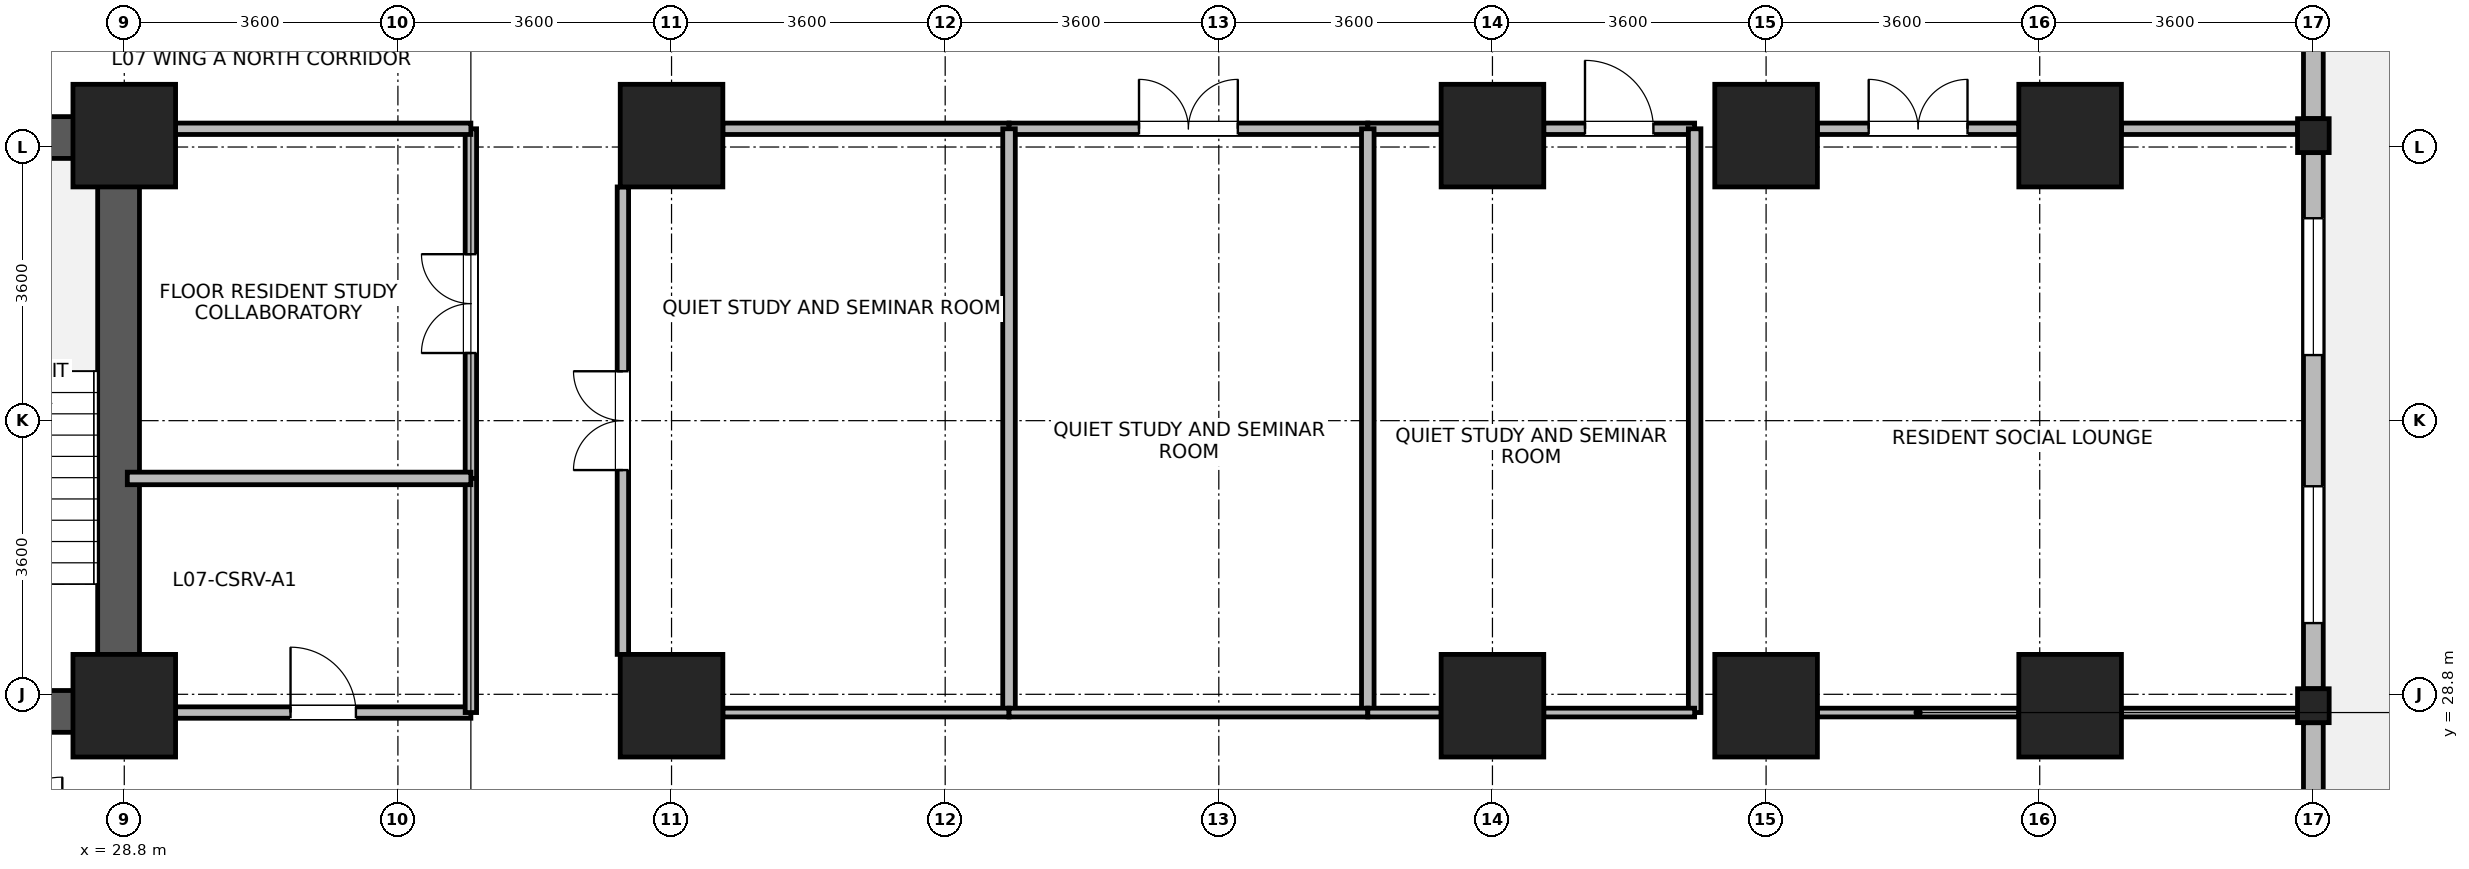
"""IFC4 building model, lengths in metres.
Left out: names, types, materials, properties, quantities, classifications, styles, units other than length and angle.
Written with IfcOpenShell. Run it as: python <this file> out.ifc"""

import sys

from ifc_helpers import new_model, si_unit, direction, frame, frame_2d, origin, origin_2d, place, context, subcontext, project, spatial, rectangle, i_section, extrude, source, transform, mapped, element, fill, save


model = new_model("IFC4")
c1 = context("Model", 3, precision=1e-05, world=origin(), true_north=direction((0.0, 1.0)))
c2 = subcontext(c1, "Body", "Model", "MODEL_VIEW")
j1 = project(units=[si_unit("LENGTHUNIT", "METRE"), si_unit("PLANEANGLEUNIT", "RADIAN")], contexts=[c1])
p1 = place(None, origin())
s1 = spatial("IfcSite", under=j1, at=p1, CompositionType="ELEMENT")
p2 = place(p1, origin())
s2 = spatial("IfcBuilding", under=s1, at=p2, CompositionType="ELEMENT")
p3 = place(p2, frame((0.0, 0.0, 32.7)))
s3 = spatial("IfcBuildingStorey", under=s2, at=p3, CompositionType="ELEMENT", Elevation=32.7)
p4 = place(p3, frame((28.725, 28.3, 0.0), z_axis=(0.0, 0.0, 1.0), x_axis=(0.0, 1.0, 0.0)))
e1 = element("IfcWall", 1, at=p4, inside=s3, PredefinedType="SHEAR", context=c2, shape_type="SweptSolid", body=[
    extrude(rectangle(XDim=8.1, YDim=0.55, at=frame_2d((4.05, 0.0))), origin(), (0.0, 0.0, 1.0), 3.45),
])
for number, where, z_axis, x_axis in (
    (2, (25.25, 28.575, 0.0), (0.0, 0.0, 1.0), (1.0, 0.0, 0.0)),
    (3, (25.25, 36.125, 0.0), (0.0, 0.0, 1.0), (1.0, 0.0, 0.0)),
):
    element("IfcWall", number, at=place(p3, frame(where, z_axis=z_axis, x_axis=x_axis)), inside=s3, PredefinedType="SHEAR", context=c2, shape_type="SweptSolid", body=[
        extrude(rectangle(XDim=3.2, YDim=0.55, at=frame_2d((1.6, 0.0))), origin(), (0.0, 0.0, 1.0), 3.45),
    ])
m1 = source(origin(), c2, "Body", "SweptSolid", [
    extrude(rectangle(XDim=1.35, YDim=1.35, at=origin_2d()), origin(), (0.0, 0.0, 1.0), 3.7),
])
for number, where, z_axis, x_axis in (
    (4, (28.8, 28.65, 0.0), (0.0, 0.0, 1.0), (1.0, 0.0, 0.0)),
    (5, (28.8, 36.15, 0.0), (0.0, 0.0, 1.0), (1.0, 0.0, 0.0)),
    (6, (36.0, 28.65, 0.0), (0.0, 0.0, 1.0), (1.0, 0.0, 0.0)),
    (7, (36.0, 36.15, 0.0), (0.0, 0.0, 1.0), (1.0, 0.0, 0.0)),
    (8, (46.8, 28.65, 0.0), (0.0, 0.0, 1.0), (1.0, 0.0, 0.0)),
    (9, (46.8, 36.15, 0.0), (0.0, 0.0, 1.0), (1.0, 0.0, 0.0)),
    (10, (50.4, 28.65, 0.0), (0.0, 0.0, 1.0), (1.0, 0.0, 0.0)),
    (11, (50.4, 36.15, 0.0), (0.0, 0.0, 1.0), (1.0, 0.0, 0.0)),
    (12, (54.4, 28.65, 0.0), (0.0, 0.0, 1.0), (1.0, 0.0, 0.0)),
    (13, (54.4, 36.15, 0.0), (0.0, 0.0, 1.0), (1.0, 0.0, 0.0)),
):
    element("IfcColumn", number, at=place(p3, frame(where, z_axis=z_axis, x_axis=x_axis)), inside=s3, PredefinedType="COLUMN", context=c2, shape_type="MappedRepresentation", body=[
        mapped(m1, transform((0.0, 0.0, 0.0), x_axis=(1.0, 0.0, 0.0), y_axis=(0.0, 1.0, 0.0), z_axis=(0.0, 0.0, 1.0), scale=1.0)),
    ])
m2 = source(origin(), c2, "Body", "SweptSolid", [
    extrude(i_section(OverallWidth=0.416, OverallDepth=0.446, WebThickness=0.029, FlangeThickness=0.04, FilletRadius=0.015, at=origin_2d()), origin(), (0.0, 0.0, 1.0), 3.7),
])
for number, where, z_axis, x_axis in (
    (14, (57.6, 28.65, 0.0), (0.0, 0.0, 1.0), (1.0, 0.0, 0.0)),
    (15, (57.6, 36.15, 0.0), (0.0, 0.0, 1.0), (1.0, 0.0, 0.0)),
):
    element("IfcColumn", number, at=place(p3, frame(where, z_axis=z_axis, x_axis=x_axis)), inside=s3, PredefinedType="COLUMN", context=c2, shape_type="MappedRepresentation", body=[
        mapped(m2, transform((0.0, 0.0, 0.0), x_axis=(1.0, 0.0, 0.0), y_axis=(0.0, 1.0, 0.0), z_axis=(0.0, 0.0, 1.0), scale=1.0)),
    ])
p5 = place(p3, frame((57.6, 28.426, 0.0), z_axis=(0.0, 0.0, 1.0), x_axis=(0.0, -1.0, 0.0)))
e16 = element("IfcWall", 16, at=p5, inside=s3, PredefinedType="STANDARD", context=c2, shape_type="SweptSolid", body=[
    extrude(rectangle(XDim=6.602, YDim=0.26, at=frame_2d((3.301, 0.0))), origin(), (0.0, 0.0, 1.0), 2.93),
])
p6 = place(p5, frame((4.052, 0.0, 0.85)))
e17 = element("IfcOpeningElement", 17, at=p6, cuts=e16, PredefinedType="OPENING", context=c2, shape_type="SweptSolid", body=[
    extrude(rectangle(XDim=1.8, YDim=1.85, at=frame_2d((0.9, 0.925))), frame((0.0, 0.14, 0.0), z_axis=(0.0, -1.0, 0.0), x_axis=(1.0, 0.0, 0.0)), (0.0, 0.0, 1.0), 0.28),
])
p7 = place(p5, frame((2.298, 0.0, 0.85)))
e18 = element("IfcOpeningElement", 18, at=p7, cuts=e16, PredefinedType="OPENING", context=c2, shape_type="SweptSolid", body=[
    extrude(rectangle(XDim=0.95, YDim=1.75, at=frame_2d((0.475, 0.875))), frame((0.0, 0.14, 0.0), z_axis=(0.0, -1.0, 0.0), x_axis=(1.0, 0.0, 0.0)), (0.0, 0.0, 1.0), 0.28),
])
p8 = place(p3, frame((57.6, 35.926, 0.0), z_axis=(0.0, 0.0, 1.0), x_axis=(0.0, -1.0, 0.0)))
e19 = element("IfcWall", 19, at=p8, inside=s3, PredefinedType="STANDARD", context=c2, shape_type="SweptSolid", body=[
    extrude(rectangle(XDim=7.052, YDim=0.26, at=frame_2d((3.526, 0.0))), origin(), (0.0, 0.0, 1.0), 2.93),
])
p9 = place(p8, frame((0.863, 0.0, 0.85)))
e20 = element("IfcOpeningElement", 20, at=p9, cuts=e19, PredefinedType="OPENING", context=c2, shape_type="SweptSolid", body=[
    extrude(rectangle(XDim=1.8, YDim=1.85, at=frame_2d((0.9, 0.925))), frame((0.0, 0.14, 0.0), z_axis=(0.0, -1.0, 0.0), x_axis=(1.0, 0.0, 0.0)), (0.0, 0.0, 1.0), 0.28),
])
p10 = place(p8, frame((4.389, 0.0, 0.85)))
e21 = element("IfcOpeningElement", 21, at=p10, cuts=e19, PredefinedType="OPENING", context=c2, shape_type="SweptSolid", body=[
    extrude(rectangle(XDim=1.8, YDim=1.85, at=frame_2d((0.9, 0.925))), frame((0.0, 0.14, 0.0), z_axis=(0.0, -1.0, 0.0), x_axis=(1.0, 0.0, 0.0)), (0.0, 0.0, 1.0), 0.28),
])
p11 = place(p3, frame((57.6, 43.33, 0.0), z_axis=(0.0, 0.0, 1.0), x_axis=(0.0, -1.0, 0.0)))
e22 = element("IfcWall", 22, at=p11, inside=s3, PredefinedType="STANDARD", context=c2, shape_type="SweptSolid", body=[
    extrude(rectangle(XDim=6.956, YDim=0.26, at=frame_2d((3.478, 0.0))), origin(), (0.0, 0.0, 1.0), 3.43),
])
p12 = place(p11, frame((0.839, 0.0, 0.85)))
e23 = element("IfcOpeningElement", 23, at=p12, cuts=e22, PredefinedType="OPENING", context=c2, shape_type="SweptSolid", body=[
    extrude(rectangle(XDim=1.8, YDim=1.85, at=frame_2d((0.9, 0.925))), frame((0.0, 0.14, 0.0), z_axis=(0.0, -1.0, 0.0), x_axis=(1.0, 0.0, 0.0)), (0.0, 0.0, 1.0), 0.28),
])
p13 = place(p11, frame((3.003, 0.0, 0.85)))
e24 = element("IfcOpeningElement", 24, at=p13, cuts=e22, PredefinedType="OPENING", context=c2, shape_type="SweptSolid", body=[
    extrude(rectangle(XDim=0.95, YDim=1.75, at=frame_2d((0.475, 0.875))), frame((0.0, 0.14, 0.0), z_axis=(0.0, -1.0, 0.0), x_axis=(1.0, 0.0, 0.0)), (0.0, 0.0, 1.0), 0.28),
])
p14 = place(p3, frame((51.075, 36.24, 0.0), z_axis=(0.0, 0.0, 1.0), x_axis=(1.0, 0.0, 0.0)))
e25 = element("IfcWall", 25, at=p14, inside=s3, PredefinedType="PARTITIONING", context=c2, shape_type="SweptSolid", body=[
    extrude(rectangle(XDim=2.65, YDim=0.15, at=frame_2d((1.325, 0.0))), origin(), (0.0, 0.0, 1.0), 2.78),
])
p15 = place(p14, frame((0.675, 0.0, 0.0)))
e26 = element("IfcOpeningElement", 26, at=p15, cuts=e25, PredefinedType="OPENING", context=c2, shape_type="SweptSolid", body=[
    extrude(rectangle(XDim=1.3, YDim=2.12, at=frame_2d((0.65, 1.06))), frame((0.0, 0.085, 0.0), z_axis=(0.0, -1.0, 0.0), x_axis=(1.0, 0.0, 0.0)), (0.0, 0.0, 1.0), 0.17),
])
p16 = place(p3, frame((55.075, 36.24, 0.0), z_axis=(0.0, 0.0, 1.0), x_axis=(1.0, 0.0, 0.0)))
e27 = element("IfcWall", 27, at=p16, inside=s3, PredefinedType="PARTITIONING", context=c2, shape_type="SweptSolid", body=[
    extrude(rectangle(XDim=2.317, YDim=0.15, at=frame_2d((1.159, 0.0))), origin(), (0.0, 0.0, 1.0), 2.78),
])
p17 = place(p3, frame((35.36, 29.325, 0.0), z_axis=(0.0, 0.0, 1.0), x_axis=(0.0, 1.0, 0.0)))
e28 = element("IfcWall", 28, at=p17, inside=s3, PredefinedType="PARTITIONING", context=c2, shape_type="SweptSolid", body=[
    extrude(rectangle(XDim=6.15, YDim=0.15, at=frame_2d((3.075, 0.0))), origin(), (0.0, 0.0, 1.0), 3.43),
])
p18 = place(p17, frame((2.425, 0.0, 0.0)))
e29 = element("IfcOpeningElement", 29, at=p18, cuts=e28, PredefinedType="OPENING", context=c2, shape_type="SweptSolid", body=[
    extrude(rectangle(XDim=1.3, YDim=2.12, at=frame_2d((0.65, 1.06))), frame((0.0, 0.085, 0.0), z_axis=(0.0, -1.0, 0.0), x_axis=(1.0, 0.0, 0.0)), (0.0, 0.0, 1.0), 0.17),
])
p19 = place(p3, frame((36.675, 36.24, 0.0), z_axis=(0.0, 0.0, 1.0), x_axis=(1.0, 0.0, 0.0)))
e30 = element("IfcWall", 30, at=p19, inside=s3, PredefinedType="PARTITIONING", context=c2, shape_type="SweptSolid", body=[
    extrude(rectangle(XDim=3.765, YDim=0.15, at=frame_2d((1.882, 0.0))), origin(), (0.0, 0.0, 1.0), 2.78),
])
p20 = place(p3, frame((40.44, 36.24, 0.0), z_axis=(0.0, 0.0, 1.0), x_axis=(1.0, 0.0, 0.0)))
e31 = element("IfcWall", 31, at=p20, inside=s3, PredefinedType="PARTITIONING", context=c2, shape_type="SweptSolid", body=[
    extrude(rectangle(XDim=4.72, YDim=0.15, at=frame_2d((2.36, 0.0))), origin(), (0.0, 0.0, 1.0), 2.78),
])
p21 = place(p20, frame((1.71, 0.0, 0.0)))
e32 = element("IfcOpeningElement", 32, at=p21, cuts=e31, PredefinedType="OPENING", context=c2, shape_type="SweptSolid", body=[
    extrude(rectangle(XDim=1.3, YDim=2.12, at=frame_2d((0.65, 1.06))), frame((0.0, 0.085, 0.0), z_axis=(0.0, -1.0, 0.0), x_axis=(1.0, 0.0, 0.0)), (0.0, 0.0, 1.0), 0.17),
])
p22 = place(p3, frame((33.36, 31.64, 0.0), z_axis=(0.0, 0.0, 1.0), x_axis=(0.0, 1.0, 0.0)))
e33 = element("IfcWall", 33, at=p22, inside=s3, PredefinedType="PARTITIONING", context=c2, shape_type="SweptSolid", body=[
    extrude(rectangle(XDim=4.6, YDim=0.15, at=frame_2d((2.3, 0.0))), origin(), (0.0, 0.0, 1.0), 3.43),
])
p23 = place(p22, frame((1.65, 0.0, 0.0)))
e34 = element("IfcOpeningElement", 34, at=p23, cuts=e33, PredefinedType="OPENING", context=c2, shape_type="SweptSolid", body=[
    extrude(rectangle(XDim=1.3, YDim=2.12, at=frame_2d((0.65, 1.06))), frame((0.0, 0.085, 0.0), z_axis=(0.0, -1.0, 0.0), x_axis=(1.0, 0.0, 0.0)), (0.0, 0.0, 1.0), 0.17),
])
p24 = place(p3, frame((29.475, 28.56, 0.0), z_axis=(0.0, 0.0, 1.0), x_axis=(1.0, 0.0, 0.0)))
e35 = element("IfcWall", 35, at=p24, inside=s3, PredefinedType="PARTITIONING", context=c2, shape_type="SweptSolid", body=[
    extrude(rectangle(XDim=3.885, YDim=0.15, at=frame_2d((1.942, 0.0))), origin(), (0.0, 0.0, 1.0), 2.78),
])
p25 = place(p24, frame((1.512, 0.0, 0.0)))
e36 = element("IfcOpeningElement", 36, at=p25, cuts=e35, PredefinedType="OPENING", context=c2, shape_type="SweptSolid", body=[
    extrude(rectangle(XDim=0.86, YDim=2.02, at=frame_2d((0.43, 1.01))), frame((0.0, 0.085, 0.0), z_axis=(0.0, -1.0, 0.0), x_axis=(1.0, 0.0, 0.0)), (0.0, 0.0, 1.0), 0.17),
])
p26 = place(p3, frame((29.475, 36.24, 0.0), z_axis=(0.0, 0.0, 1.0), x_axis=(1.0, 0.0, 0.0)))
e37 = element("IfcWall", 37, at=p26, inside=s3, PredefinedType="PARTITIONING", context=c2, shape_type="SweptSolid", body=[
    extrude(rectangle(XDim=3.885, YDim=0.15, at=frame_2d((1.942, 0.0))), origin(), (0.0, 0.0, 1.0), 2.78),
])
p27 = place(p3, frame((45.16, 36.24, 0.0), z_axis=(0.0, 0.0, 1.0), x_axis=(1.0, 0.0, 0.0)))
e38 = element("IfcWall", 38, at=p27, inside=s3, PredefinedType="PARTITIONING", context=c2, shape_type="SweptSolid", body=[
    extrude(rectangle(XDim=0.965, YDim=0.15, at=frame_2d((0.482, 0.0))), origin(), (0.0, 0.0, 1.0), 2.78),
])
p28 = place(p3, frame((47.475, 36.24, 0.0), z_axis=(0.0, 0.0, 1.0), x_axis=(1.0, 0.0, 0.0)))
e39 = element("IfcWall", 39, at=p28, inside=s3, PredefinedType="PARTITIONING", context=c2, shape_type="SweptSolid", body=[
    extrude(rectangle(XDim=1.985, YDim=0.15, at=frame_2d((0.992, 0.0))), origin(), (0.0, 0.0, 1.0), 2.78),
])
p29 = place(p28, frame((0.542, 0.0, 0.0)))
e40 = element("IfcOpeningElement", 40, at=p29, cuts=e39, PredefinedType="OPENING", context=c2, shape_type="SweptSolid", body=[
    extrude(rectangle(XDim=0.9, YDim=2.08, at=frame_2d((0.45, 1.04))), frame((0.0, 0.085, 0.0), z_axis=(0.0, -1.0, 0.0), x_axis=(1.0, 0.0, 0.0)), (0.0, 0.0, 1.0), 0.17),
])
p30 = place(p3, frame((33.36, 28.56, 0.0), z_axis=(0.0, 0.0, 1.0), x_axis=(0.0, 1.0, 0.0)))
e41 = element("IfcWall", 41, at=p30, inside=s3, PredefinedType="PARTITIONING", context=c2, shape_type="SweptSolid", body=[
    extrude(rectangle(XDim=3.08, YDim=0.15, at=frame_2d((1.54, 0.0))), origin(), (0.0, 0.0, 1.0), 3.43),
])
p31 = place(p3, frame((51.075, 28.56, 0.0), z_axis=(0.0, 0.0, 1.0), x_axis=(1.0, 0.0, 0.0)))
e42 = element("IfcWall", 42, at=p31, inside=s3, PredefinedType="PARTITIONING", context=c2, shape_type="SweptSolid", body=[
    extrude(rectangle(XDim=2.65, YDim=0.115, at=frame_2d((1.325, 0.0))), origin(), (0.0, 0.0, 1.0), 2.78),
])
p32 = place(p3, frame((55.075, 28.56, 0.0), z_axis=(0.0, 0.0, 1.0), x_axis=(1.0, 0.0, 0.0)))
e43 = element("IfcWall", 43, at=p32, inside=s3, PredefinedType="PARTITIONING", context=c2, shape_type="SweptSolid", body=[
    extrude(rectangle(XDim=2.317, YDim=0.115, at=frame_2d((1.159, 0.0))), origin(), (0.0, 0.0, 1.0), 2.78),
])
for number, where, z_axis, x_axis in (
    (44, (40.44, 28.56, 0.0), (0.0, 0.0, 1.0), (0.0, 1.0, 0.0)),
    (45, (45.16, 28.56, 0.0), (0.0, 0.0, 1.0), (0.0, 1.0, 0.0)),
    (46, (49.46, 28.56, 0.0), (0.0, 0.0, 1.0), (0.0, 1.0, 0.0)),
):
    element("IfcWall", number, at=place(p3, frame(where, z_axis=z_axis, x_axis=x_axis)), inside=s3, PredefinedType="PARTITIONING", context=c2, shape_type="SweptSolid", body=[
        extrude(rectangle(XDim=7.68, YDim=0.165, at=frame_2d((3.84, 0.0))), origin(), (0.0, 0.0, 1.0), 3.43),
    ])
p33 = place(p3, frame((36.675, 28.56, 0.0), z_axis=(0.0, 0.0, 1.0), x_axis=(1.0, 0.0, 0.0)))
e47 = element("IfcWall", 47, at=p33, inside=s3, PredefinedType="PARTITIONING", context=c2, shape_type="SweptSolid", body=[
    extrude(rectangle(XDim=3.765, YDim=0.115, at=frame_2d((1.882, 0.0))), origin(), (0.0, 0.0, 1.0), 2.78),
])
p34 = place(p3, frame((40.44, 28.56, 0.0), z_axis=(0.0, 0.0, 1.0), x_axis=(1.0, 0.0, 0.0)))
e48 = element("IfcWall", 48, at=p34, inside=s3, PredefinedType="PARTITIONING", context=c2, shape_type="SweptSolid", body=[
    extrude(rectangle(XDim=4.72, YDim=0.115, at=frame_2d((2.36, 0.0))), origin(), (0.0, 0.0, 1.0), 2.78),
])
p35 = place(p3, frame((28.84, 31.64, 0.0), z_axis=(0.0, 0.0, 1.0), x_axis=(1.0, 0.0, 0.0)))
e49 = element("IfcWall", 49, at=p35, inside=s3, PredefinedType="PARTITIONING", context=c2, shape_type="SweptSolid", body=[
    extrude(rectangle(XDim=4.52, YDim=0.165, at=frame_2d((2.26, 0.0))), origin(), (0.0, 0.0, 1.0), 3.43),
])
p36 = place(p3, frame((45.16, 28.56, 0.0), z_axis=(0.0, 0.0, 1.0), x_axis=(1.0, 0.0, 0.0)))
e50 = element("IfcWall", 50, at=p36, inside=s3, PredefinedType="PARTITIONING", context=c2, shape_type="SweptSolid", body=[
    extrude(rectangle(XDim=0.965, YDim=0.115, at=frame_2d((0.482, 0.0))), origin(), (0.0, 0.0, 1.0), 2.78),
])
p37 = place(p3, frame((47.475, 28.56, 0.0), z_axis=(0.0, 0.0, 1.0), x_axis=(1.0, 0.0, 0.0)))
e51 = element("IfcWall", 51, at=p37, inside=s3, PredefinedType="PARTITIONING", context=c2, shape_type="SweptSolid", body=[
    extrude(rectangle(XDim=1.985, YDim=0.115, at=frame_2d((0.992, 0.0))), origin(), (0.0, 0.0, 1.0), 2.78),
])
p38 = place(p9, origin())
e52 = element("IfcWindow", 52, at=p38, inside=s3, PartitioningType="SINGLE_PANEL", PredefinedType="WINDOW", context=c2, shape_type="SweptSolid", body=[
    extrude(rectangle(XDim=1.8, YDim=1.85, at=frame_2d((0.9, 0.925))), frame((0.0, 0.03, 0.0), z_axis=(0.0, -1.0, 0.0), x_axis=(1.0, 0.0, 0.0)), (0.0, 0.0, 1.0), 0.06),
])
fill(e20, e52)
p39 = place(p10, origin())
e53 = element("IfcWindow", 53, at=p39, inside=s3, PartitioningType="SINGLE_PANEL", PredefinedType="WINDOW", context=c2, shape_type="SweptSolid", body=[
    extrude(rectangle(XDim=1.8, YDim=1.85, at=frame_2d((0.9, 0.925))), frame((0.0, 0.03, 0.0), z_axis=(0.0, -1.0, 0.0), x_axis=(1.0, 0.0, 0.0)), (0.0, 0.0, 1.0), 0.06),
])
fill(e21, e53)
p40 = place(p15, origin())
e54 = element("IfcDoor", 54, at=p40, inside=s3, OperationType="DOUBLE_DOOR_SINGLE_SWING", PredefinedType="DOOR", context=c2, shape_type="SweptSolid", body=[
    extrude(rectangle(XDim=1.3, YDim=2.12, at=frame_2d((0.65, 1.06))), frame((0.0, 0.025, 0.0), z_axis=(0.0, -1.0, 0.0), x_axis=(1.0, 0.0, 0.0)), (0.0, 0.0, 1.0), 0.05),
])
fill(e26, e54)
p41 = place(p18, origin())
e55 = element("IfcDoor", 55, at=p41, inside=s3, OperationType="DOUBLE_DOOR_SINGLE_SWING", PredefinedType="DOOR", context=c2, shape_type="SweptSolid", body=[
    extrude(rectangle(XDim=1.3, YDim=2.12, at=frame_2d((0.65, 1.06))), frame((0.0, 0.025, 0.0), z_axis=(0.0, -1.0, 0.0), x_axis=(1.0, 0.0, 0.0)), (0.0, 0.0, 1.0), 0.05),
])
fill(e29, e55)
p42 = place(p21, origin())
e56 = element("IfcDoor", 56, at=p42, inside=s3, OperationType="DOUBLE_DOOR_SINGLE_SWING", PredefinedType="DOOR", context=c2, shape_type="SweptSolid", body=[
    extrude(rectangle(XDim=1.3, YDim=2.12, at=frame_2d((0.65, 1.06))), frame((0.0, 0.025, 0.0), z_axis=(0.0, -1.0, 0.0), x_axis=(1.0, 0.0, 0.0)), (0.0, 0.0, 1.0), 0.05),
])
fill(e32, e56)
p43 = place(p23, origin())
e57 = element("IfcDoor", 57, at=p43, inside=s3, OperationType="DOUBLE_DOOR_SINGLE_SWING", PredefinedType="DOOR", context=c2, shape_type="SweptSolid", body=[
    extrude(rectangle(XDim=1.3, YDim=2.12, at=frame_2d((0.65, 1.06))), frame((0.0, 0.025, 0.0), z_axis=(0.0, -1.0, 0.0), x_axis=(1.0, 0.0, 0.0)), (0.0, 0.0, 1.0), 0.05),
])
fill(e34, e57)
p44 = place(p25, origin())
e58 = element("IfcDoor", 58, at=p44, inside=s3, OperationType="SINGLE_SWING_LEFT", PredefinedType="DOOR", context=c2, shape_type="SweptSolid", body=[
    extrude(rectangle(XDim=0.86, YDim=2.02, at=frame_2d((0.43, 1.01))), frame((0.0, 0.025, 0.0), z_axis=(0.0, -1.0, 0.0), x_axis=(1.0, 0.0, 0.0)), (0.0, 0.0, 1.0), 0.05),
])
fill(e36, e58)
p45 = place(p29, origin())
e59 = element("IfcDoor", 59, at=p45, inside=s3, OperationType="SINGLE_SWING_LEFT", PredefinedType="DOOR", context=c2, shape_type="SweptSolid", body=[
    extrude(rectangle(XDim=0.9, YDim=2.08, at=frame_2d((0.45, 1.04))), frame((0.0, 0.025, 0.0), z_axis=(0.0, -1.0, 0.0), x_axis=(1.0, 0.0, 0.0)), (0.0, 0.0, 1.0), 0.05),
])
fill(e40, e59)
save(model, sys.argv[1])
